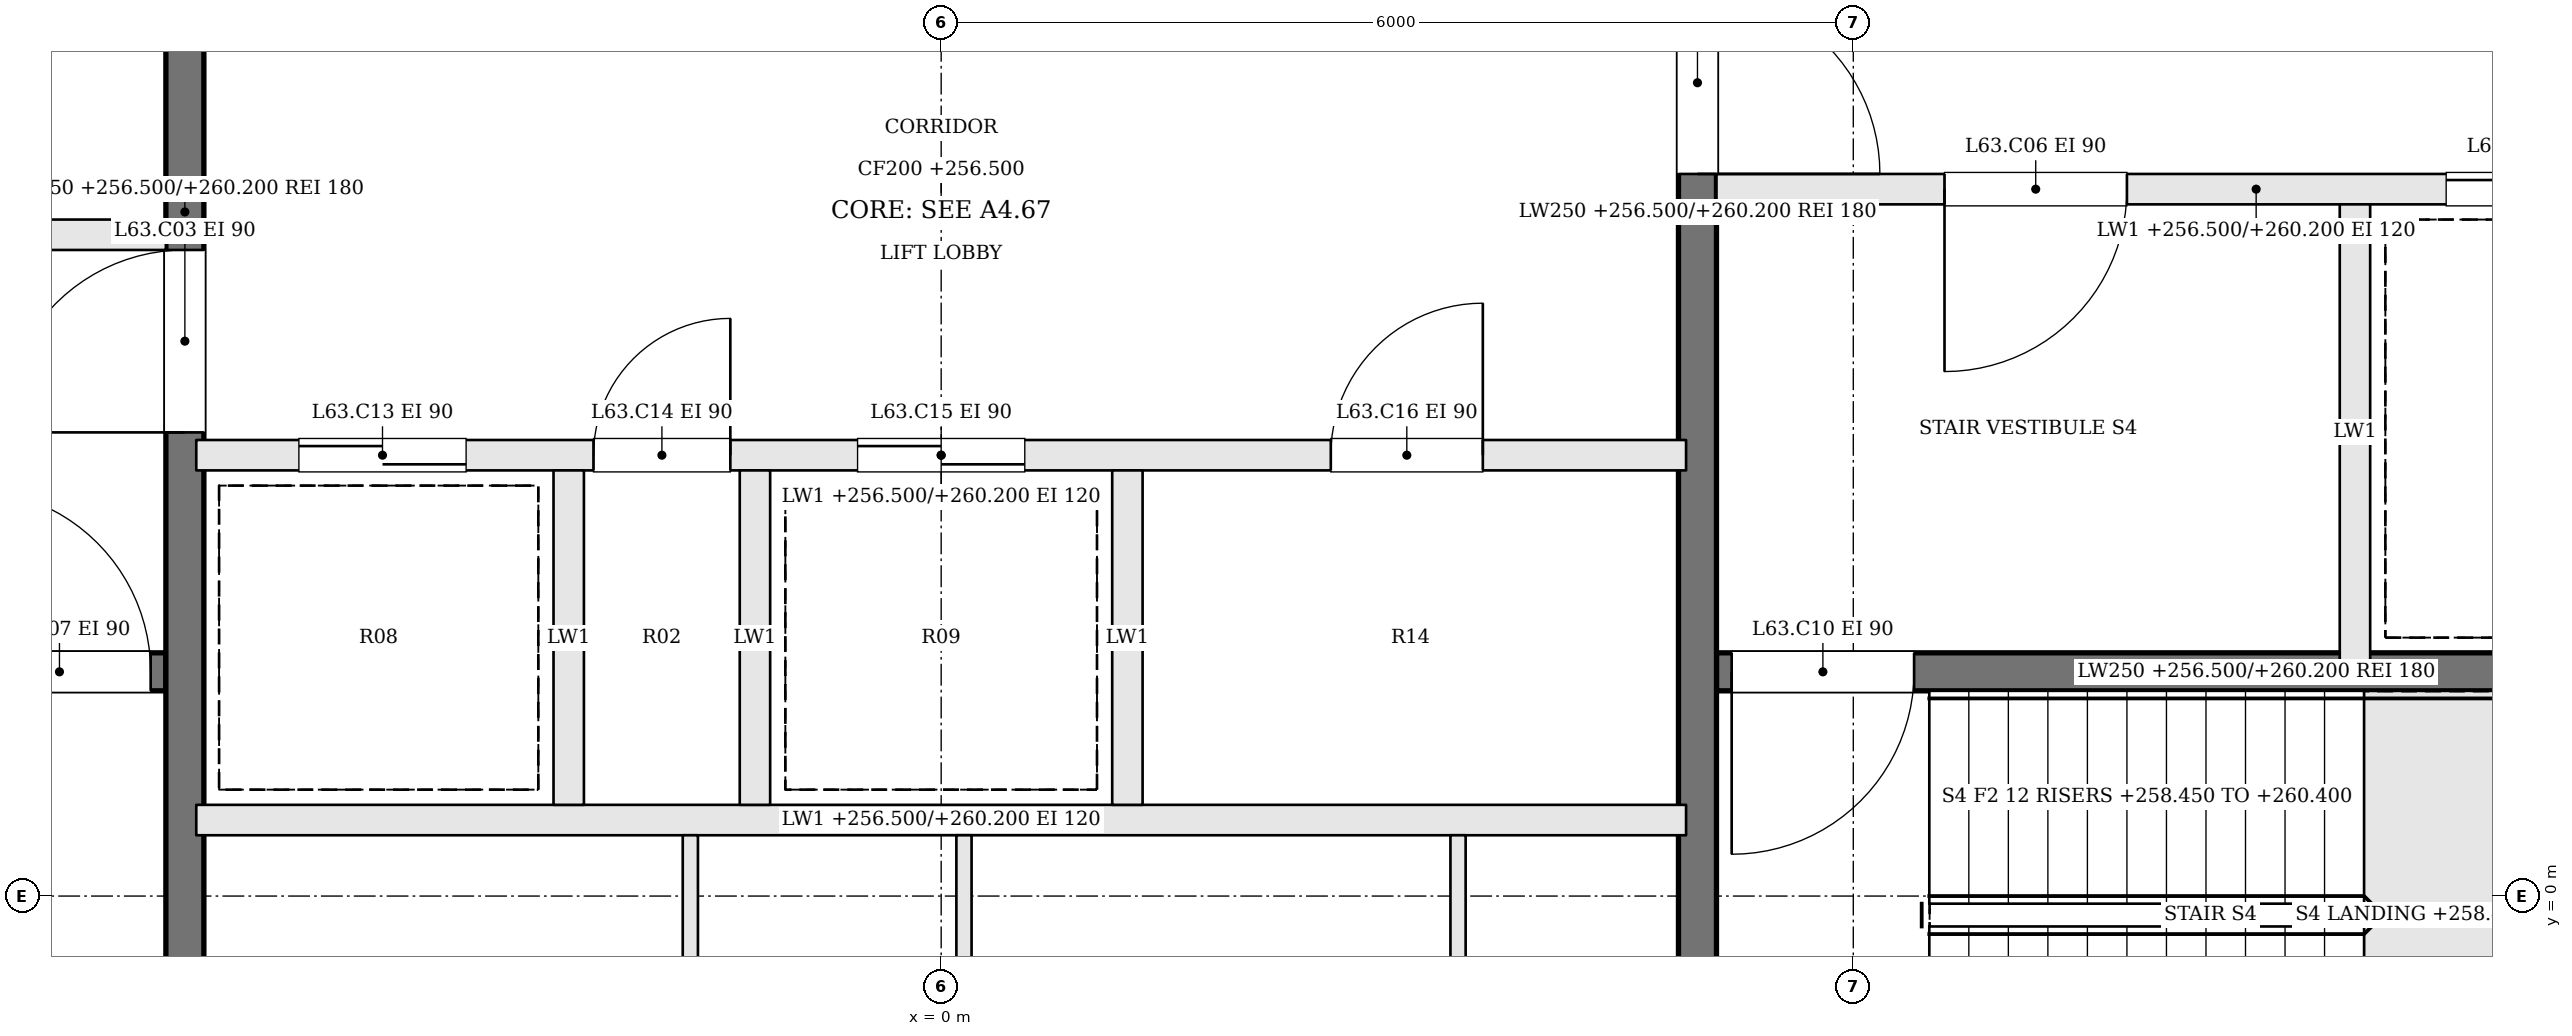
"""IFC4 building model, lengths in metres.
Left out: names, types, materials, properties, quantities, classifications, styles, units other than length and angle.
Written with IfcOpenShell. Run it as: python <this file> out.ifc"""

import sys

from ifc_helpers import new_model, si_unit, direction, frame, frame_2d, origin, place, context, subcontext, project, spatial, rectangle, extrude, element, fill, save


model = new_model("IFC4")
c1 = context("Model", 3, precision=1e-05, world=origin(), true_north=direction((0.0, 1.0)))
c2 = subcontext(c1, "Body", "Model", "MODEL_VIEW")
j1 = project(units=[si_unit("LENGTHUNIT", "METRE"), si_unit("PLANEANGLEUNIT", "RADIAN")], contexts=[c1])
p1 = place(None, origin())
s1 = spatial("IfcSite", under=j1, at=p1, CompositionType="ELEMENT")
p2 = place(p1, origin())
s2 = spatial("IfcBuilding", under=s1, at=p2, CompositionType="ELEMENT")
p3 = place(p2, frame((0.0, 0.0, 256.5)))
s3 = spatial("IfcBuildingStorey", under=s2, at=p3, CompositionType="ELEMENT", Elevation=256.5)
p4 = place(p3, frame((-12.2, 1.475, 0.0), z_axis=(0.0, 0.0, 1.0), x_axis=(1.0, 0.0, 0.0)))
e1 = element("IfcWall", 1, at=p4, inside=s3, PredefinedType="SOLIDWALL", context=c2, shape_type="SweptSolid", body=[
    extrude(rectangle(XDim=7.1, YDim=0.25, at=frame_2d((3.55, 0.0))), origin(), (0.0, 0.0, 1.0), 3.7),
])
p5 = place(p4, frame((5.8, 0.0, 0.0)))
e2 = element("IfcOpeningElement", 2, at=p5, cuts=e1, PredefinedType="OPENING", context=c2, shape_type="SweptSolid", body=[
    extrude(rectangle(XDim=1.2, YDim=2.1, at=frame_2d((0.6, 1.05))), frame((0.0, 0.135, 0.0), z_axis=(0.0, -1.0, 0.0), x_axis=(1.0, 0.0, 0.0)), (0.0, 0.0, 1.0), 0.27),
])
p6 = place(p3, frame((-12.2, 4.35, 0.0), z_axis=(0.0, 0.0, 1.0), x_axis=(1.0, 0.0, 0.0)))
e3 = element("IfcWall", 3, at=p6, inside=s3, PredefinedType="SOLIDWALL", context=c2, shape_type="SweptSolid", body=[
    extrude(rectangle(XDim=7.1, YDim=0.2, at=frame_2d((3.55, 0.0))), origin(), (0.0, 0.0, 1.0), 3.7),
])
p7 = place(p6, frame((4.4, 0.0, 0.0)))
e4 = element("IfcOpeningElement", 4, at=p7, cuts=e3, PredefinedType="OPENING", context=c2, shape_type="SweptSolid", body=[
    extrude(rectangle(XDim=1.2, YDim=2.1, at=frame_2d((0.6, 1.05))), frame((0.0, 0.11, 0.0), z_axis=(0.0, -1.0, 0.0), x_axis=(1.0, 0.0, 0.0)), (0.0, 0.0, 1.0), 0.22),
])
p8 = place(p6, frame((1.1, 0.0, 0.0)))
e5 = element("IfcOpeningElement", 5, at=p8, cuts=e3, PredefinedType="OPENING", context=c2, shape_type="SweptSolid", body=[
    extrude(rectangle(XDim=1.2, YDim=2.1, at=frame_2d((0.6, 1.05))), frame((0.0, 0.11, 0.0), z_axis=(0.0, -1.0, 0.0), x_axis=(1.0, 0.0, 0.0)), (0.0, 0.0, 1.0), 0.22),
])
p9 = place(p3, frame((12.2, 4.65, 0.0), z_axis=(0.0, 0.0, 1.0), x_axis=(-1.0, 0.0, 0.0)))
e6 = element("IfcWall", 6, at=p9, inside=s3, PredefinedType="SOLIDWALL", context=c2, shape_type="SweptSolid", body=[
    extrude(rectangle(XDim=7.1, YDim=0.2, at=frame_2d((3.55, 0.0))), origin(), (0.0, 0.0, 1.0), 3.7),
])
p10 = place(p9, frame((4.4, 0.0, 0.0)))
e7 = element("IfcOpeningElement", 7, at=p10, cuts=e6, PredefinedType="OPENING", context=c2, shape_type="SweptSolid", body=[
    extrude(rectangle(XDim=1.2, YDim=2.1, at=frame_2d((0.6, 1.05))), frame((0.0, 0.11, 0.0), z_axis=(0.0, -1.0, 0.0), x_axis=(1.0, 0.0, 0.0)), (0.0, 0.0, 1.0), 0.22),
])
p11 = place(p9, frame((1.1, 0.0, 0.0)))
e8 = element("IfcOpeningElement", 8, at=p11, cuts=e6, PredefinedType="OPENING", context=c2, shape_type="SweptSolid", body=[
    extrude(rectangle(XDim=1.2, YDim=2.1, at=frame_2d((0.6, 1.05))), frame((0.0, 0.11, 0.0), z_axis=(0.0, -1.0, 0.0), x_axis=(1.0, 0.0, 0.0)), (0.0, 0.0, 1.0), 0.22),
])
p12 = place(p3, frame((12.2, 1.475, 0.0), z_axis=(0.0, 0.0, 1.0), x_axis=(-1.0, 0.0, 0.0)))
e9 = element("IfcWall", 9, at=p12, inside=s3, PredefinedType="SOLIDWALL", context=c2, shape_type="SweptSolid", body=[
    extrude(rectangle(XDim=7.1, YDim=0.25, at=frame_2d((3.55, 0.0))), origin(), (0.0, 0.0, 1.0), 3.7),
])
p13 = place(p12, frame((5.8, 0.0, 0.0)))
e10 = element("IfcOpeningElement", 10, at=p13, cuts=e9, PredefinedType="OPENING", context=c2, shape_type="SweptSolid", body=[
    extrude(rectangle(XDim=1.2, YDim=2.1, at=frame_2d((0.6, 1.05))), frame((0.0, 0.135, 0.0), z_axis=(0.0, -1.0, 0.0), x_axis=(1.0, 0.0, 0.0)), (0.0, 0.0, 1.0), 0.27),
])
p14 = place(p3, frame((9.3, 4.55, 0.0), z_axis=(0.0, 0.0, 1.0), x_axis=(0.0, -1.0, 0.0)))
e11 = element("IfcWall", 11, at=p14, inside=s3, PredefinedType="SOLIDWALL", context=c2, shape_type="SweptSolid", body=[
    extrude(rectangle(XDim=3.0, YDim=0.2, at=frame_2d((1.5, 0.0))), origin(), (0.0, 0.0, 1.0), 3.7),
])
p15 = place(p3, frame((-4.975, -2.2, 0.0), z_axis=(0.0, 0.0, 1.0), x_axis=(0.0, 1.0, 0.0)))
e12 = element("IfcWall", 12, at=p15, inside=s3, PredefinedType="SOLIDWALL", context=c2, shape_type="SweptSolid", body=[
    extrude(rectangle(XDim=13.4, YDim=0.25, at=frame_2d((6.7, 0.0))), origin(), (0.0, 0.0, 1.0), 3.7),
])
p16 = place(p15, frame((5.25, 0.0, 0.0)))
e13 = element("IfcOpeningElement", 13, at=p16, cuts=e12, PredefinedType="OPENING", context=c2, shape_type="SweptSolid", body=[
    extrude(rectangle(XDim=1.2, YDim=2.1, at=frame_2d((0.6, 1.05))), frame((0.0, 0.135, 0.0), z_axis=(0.0, -1.0, 0.0), x_axis=(1.0, 0.0, 0.0)), (0.0, 0.0, 1.0), 0.27),
])
p17 = place(p3, frame((4.975, 11.2, 0.0), z_axis=(0.0, 0.0, 1.0), x_axis=(0.0, -1.0, 0.0)))
e14 = element("IfcWall", 14, at=p17, inside=s3, PredefinedType="SOLIDWALL", context=c2, shape_type="SweptSolid", body=[
    extrude(rectangle(XDim=13.4, YDim=0.25, at=frame_2d((6.7, 0.0))), origin(), (0.0, 0.0, 1.0), 3.7),
])
p18 = place(p17, frame((5.25, 0.0, 0.0)))
e15 = element("IfcOpeningElement", 15, at=p18, cuts=e14, PredefinedType="OPENING", context=c2, shape_type="SweptSolid", body=[
    extrude(rectangle(XDim=1.2, YDim=2.1, at=frame_2d((0.6, 1.05))), frame((0.0, 0.135, 0.0), z_axis=(0.0, -1.0, 0.0), x_axis=(1.0, 0.0, 0.0)), (0.0, 0.0, 1.0), 0.27),
])
p19 = place(p3, frame((-4.9, 0.5, 0.0), z_axis=(0.0, 0.0, 1.0), x_axis=(1.0, 0.0, 0.0)))
e16 = element("IfcWall", 16, at=p19, inside=s3, PredefinedType="SOLIDWALL", context=c2, shape_type="SweptSolid", body=[
    extrude(rectangle(XDim=9.8, YDim=0.2, at=frame_2d((4.9, 0.0))), origin(), (0.0, 0.0, 1.0), 3.7),
])
p20 = place(p3, frame((-4.9, 2.9, 0.0), z_axis=(0.0, 0.0, 1.0), x_axis=(1.0, 0.0, 0.0)))
e17 = element("IfcWall", 17, at=p20, inside=s3, PredefinedType="SOLIDWALL", context=c2, shape_type="SweptSolid", body=[
    extrude(rectangle(XDim=9.8, YDim=0.2, at=frame_2d((4.9, 0.0))), origin(), (0.0, 0.0, 1.0), 3.7),
])
p21 = place(p20, frame((0.675, 0.0, 0.0)))
e18 = element("IfcOpeningElement", 18, at=p21, cuts=e17, PredefinedType="OPENING", context=c2, shape_type="SweptSolid", body=[
    extrude(rectangle(XDim=1.1, YDim=2.1, at=frame_2d((0.55, 1.05))), frame((0.0, 0.11, 0.0), z_axis=(0.0, -1.0, 0.0), x_axis=(1.0, 0.0, 0.0)), (0.0, 0.0, 1.0), 0.22),
])
p22 = place(p20, frame((2.613, 0.0, 0.0)))
e19 = element("IfcOpeningElement", 19, at=p22, cuts=e17, PredefinedType="OPENING", context=c2, shape_type="SweptSolid", body=[
    extrude(rectangle(XDim=0.9, YDim=2.1, at=frame_2d((0.45, 1.05))), frame((0.0, 0.11, 0.0), z_axis=(0.0, -1.0, 0.0), x_axis=(1.0, 0.0, 0.0)), (0.0, 0.0, 1.0), 0.22),
])
p23 = place(p20, frame((4.35, 0.0, 0.0)))
e20 = element("IfcOpeningElement", 20, at=p23, cuts=e17, PredefinedType="OPENING", context=c2, shape_type="SweptSolid", body=[
    extrude(rectangle(XDim=1.1, YDim=2.1, at=frame_2d((0.55, 1.05))), frame((0.0, 0.11, 0.0), z_axis=(0.0, -1.0, 0.0), x_axis=(1.0, 0.0, 0.0)), (0.0, 0.0, 1.0), 0.22),
])
p24 = place(p20, frame((7.463, 0.0, 0.0)))
e21 = element("IfcOpeningElement", 21, at=p24, cuts=e17, PredefinedType="OPENING", context=c2, shape_type="SweptSolid", body=[
    extrude(rectangle(XDim=1.0, YDim=2.1, at=frame_2d((0.5, 1.05))), frame((0.0, 0.11, 0.0), z_axis=(0.0, -1.0, 0.0), x_axis=(1.0, 0.0, 0.0)), (0.0, 0.0, 1.0), 0.22),
])
for number, where, z_axis, x_axis in (
    (22, (-2.45, 0.6, 0.0), (0.0, 0.0, 1.0), (0.0, 1.0, 0.0)),
    (23, (-1.225, 0.6, 0.0), (0.0, 0.0, 1.0), (0.0, 1.0, 0.0)),
    (24, (1.225, 0.6, 0.0), (0.0, 0.0, 1.0), (0.0, 1.0, 0.0)),
):
    element("IfcWall", number, at=place(p3, frame(where, z_axis=z_axis, x_axis=x_axis)), inside=s3, PredefinedType="SOLIDWALL", context=c2, shape_type="SweptSolid", body=[
        extrude(rectangle(XDim=2.2, YDim=0.2, at=frame_2d((1.1, 0.0))), origin(), (0.0, 0.0, 1.0), 3.7),
    ])
for number, where, z_axis, x_axis in (
    (25, (-1.65, -2.2, 0.0), (0.0, 0.0, 1.0), (0.0, 1.0, 0.0)),
    (26, (0.15, -2.2, 0.0), (0.0, 0.0, 1.0), (0.0, 1.0, 0.0)),
    (27, (3.4, -2.2, 0.0), (0.0, 0.0, 1.0), (0.0, 1.0, 0.0)),
):
    element("IfcWall", number, at=place(p3, frame(where, z_axis=z_axis, x_axis=x_axis)), inside=s3, PredefinedType="PARTITIONING", context=c2, shape_type="SweptSolid", body=[
        extrude(rectangle(XDim=2.6, YDim=0.1, at=frame_2d((1.3, 0.0))), origin(), (0.0, 0.0, 1.0), 3.7),
    ])
p25 = place(p16, origin())
e28 = element("IfcDoor", 28, at=p25, inside=s3, OperationType="SINGLE_SWING_LEFT", PredefinedType="DOOR", context=c2, shape_type="SweptSolid", body=[
    extrude(rectangle(XDim=1.2, YDim=2.1, at=frame_2d((0.6, 1.05))), frame((0.0, 0.025, 0.0), z_axis=(0.0, -1.0, 0.0), x_axis=(1.0, 0.0, 0.0)), (0.0, 0.0, 1.0), 0.05),
])
fill(e13, e28)
p26 = place(p18, origin())
e29 = element("IfcDoor", 29, at=p26, inside=s3, OperationType="SINGLE_SWING_RIGHT", PredefinedType="DOOR", context=c2, shape_type="SweptSolid", body=[
    extrude(rectangle(XDim=1.2, YDim=2.1, at=frame_2d((0.6, 1.05))), frame((0.0, 0.025, 0.0), z_axis=(0.0, -1.0, 0.0), x_axis=(1.0, 0.0, 0.0)), (0.0, 0.0, 1.0), 0.05),
])
fill(e15, e29)
p27 = place(p10, origin())
e30 = element("IfcDoor", 30, at=p27, inside=s3, OperationType="SINGLE_SWING_RIGHT", PredefinedType="DOOR", context=c2, shape_type="SweptSolid", body=[
    extrude(rectangle(XDim=1.2, YDim=2.1, at=frame_2d((0.6, 1.05))), frame((0.0, 0.025, 0.0), z_axis=(0.0, -1.0, 0.0), x_axis=(1.0, 0.0, 0.0)), (0.0, 0.0, 1.0), 0.05),
])
fill(e7, e30)
p28 = place(p5, origin())
e31 = element("IfcDoor", 31, at=p28, inside=s3, OperationType="SINGLE_SWING_LEFT", PredefinedType="DOOR", context=c2, shape_type="SweptSolid", body=[
    extrude(rectangle(XDim=1.2, YDim=2.1, at=frame_2d((0.6, 1.05))), frame((0.0, 0.025, 0.0), z_axis=(0.0, -1.0, 0.0), x_axis=(1.0, 0.0, 0.0)), (0.0, 0.0, 1.0), 0.05),
])
fill(e2, e31)
p29 = place(p13, origin())
e32 = element("IfcDoor", 32, at=p29, inside=s3, OperationType="SINGLE_SWING_RIGHT", PredefinedType="DOOR", context=c2, shape_type="SweptSolid", body=[
    extrude(rectangle(XDim=1.2, YDim=2.1, at=frame_2d((0.6, 1.05))), frame((0.0, 0.025, 0.0), z_axis=(0.0, -1.0, 0.0), x_axis=(1.0, 0.0, 0.0)), (0.0, 0.0, 1.0), 0.05),
])
fill(e10, e32)
p30 = place(p11, origin())
e33 = element("IfcDoor", 33, at=p30, inside=s3, OperationType="SLIDING_TO_RIGHT", PredefinedType="DOOR", context=c2, shape_type="SweptSolid", body=[
    extrude(rectangle(XDim=1.2, YDim=2.1, at=frame_2d((0.6, 1.05))), frame((0.0, 0.025, 0.0), z_axis=(0.0, -1.0, 0.0), x_axis=(1.0, 0.0, 0.0)), (0.0, 0.0, 1.0), 0.05),
])
fill(e8, e33)
p31 = place(p21, origin())
e34 = element("IfcDoor", 34, at=p31, inside=s3, OperationType="SLIDING_TO_RIGHT", PredefinedType="DOOR", context=c2, shape_type="SweptSolid", body=[
    extrude(rectangle(XDim=1.1, YDim=2.1, at=frame_2d((0.55, 1.05))), frame((0.0, 0.025, 0.0), z_axis=(0.0, -1.0, 0.0), x_axis=(1.0, 0.0, 0.0)), (0.0, 0.0, 1.0), 0.05),
])
fill(e18, e34)
p32 = place(p22, origin())
e35 = element("IfcDoor", 35, at=p32, inside=s3, OperationType="SINGLE_SWING_RIGHT", PredefinedType="DOOR", context=c2, shape_type="SweptSolid", body=[
    extrude(rectangle(XDim=0.9, YDim=2.1, at=frame_2d((0.45, 1.05))), frame((0.0, 0.025, 0.0), z_axis=(0.0, -1.0, 0.0), x_axis=(1.0, 0.0, 0.0)), (0.0, 0.0, 1.0), 0.05),
])
fill(e19, e35)
p33 = place(p23, origin())
e36 = element("IfcDoor", 36, at=p33, inside=s3, OperationType="SLIDING_TO_LEFT", PredefinedType="DOOR", context=c2, shape_type="SweptSolid", body=[
    extrude(rectangle(XDim=1.1, YDim=2.1, at=frame_2d((0.55, 1.05))), frame((0.0, 0.025, 0.0), z_axis=(0.0, -1.0, 0.0), x_axis=(1.0, 0.0, 0.0)), (0.0, 0.0, 1.0), 0.05),
])
fill(e20, e36)
p34 = place(p24, origin())
e37 = element("IfcDoor", 37, at=p34, inside=s3, OperationType="SINGLE_SWING_RIGHT", PredefinedType="DOOR", context=c2, shape_type="SweptSolid", body=[
    extrude(rectangle(XDim=1.0, YDim=2.1, at=frame_2d((0.5, 1.05))), frame((0.0, 0.025, 0.0), z_axis=(0.0, -1.0, 0.0), x_axis=(1.0, 0.0, 0.0)), (0.0, 0.0, 1.0), 0.05),
])
fill(e21, e37)
save(model, sys.argv[1])
